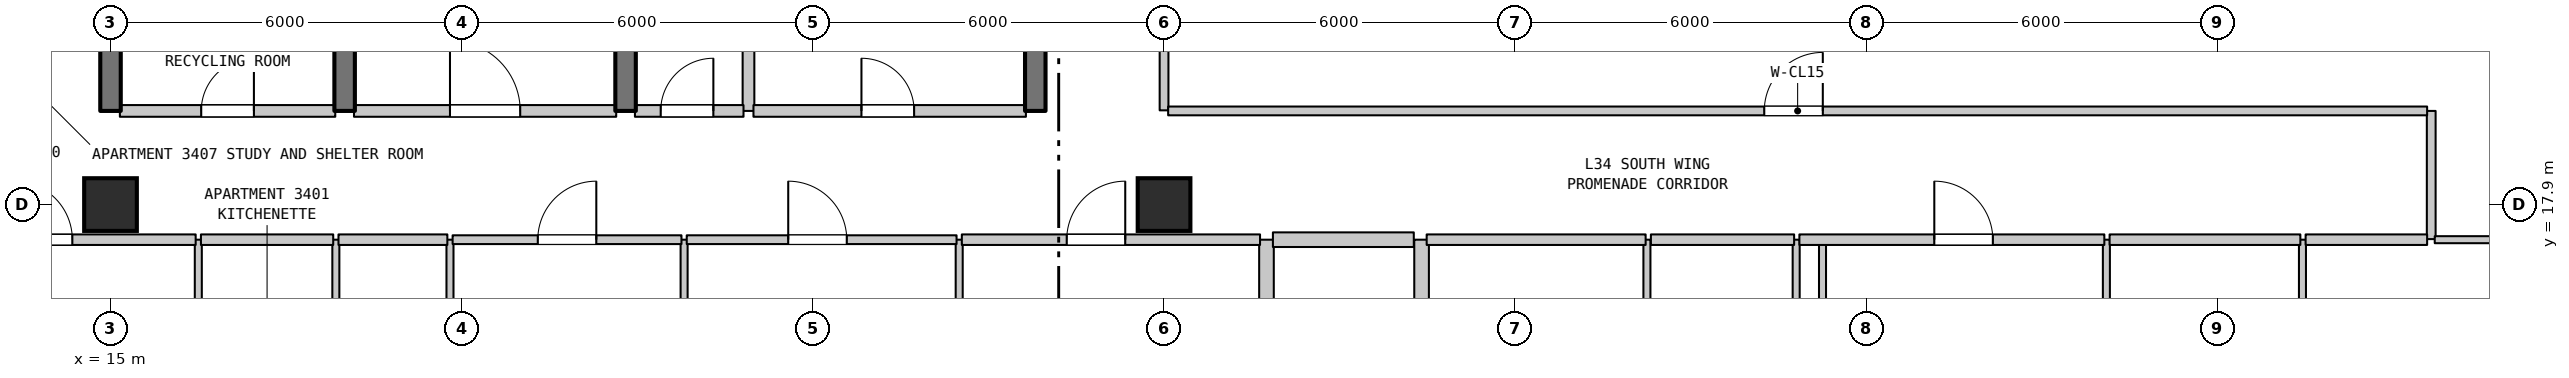
"""IFC4 building model, lengths in metres.
Left out: names, types, materials, properties, quantities, classifications, styles, units other than length and angle.
Written with IfcOpenShell. Run it as: python <this file> out.ifc"""

import sys

from ifc_helpers import new_model, si_unit, direction, frame, frame_2d, origin, origin_2d, place, context, subcontext, project, spatial, rectangle, extrude, element, fill, save


model = new_model("IFC4")
c1 = context("Model", 3, precision=1e-05, world=origin(), true_north=direction((0.0, 1.0)))
c2 = subcontext(c1, "Body", "Model", "MODEL_VIEW")
j1 = project(units=[si_unit("LENGTHUNIT", "METRE"), si_unit("PLANEANGLEUNIT", "RADIAN")], contexts=[c1])
p1 = place(None, origin())
s1 = spatial("IfcSite", under=j1, at=p1, CompositionType="ELEMENT")
p2 = place(p1, origin())
s2 = spatial("IfcBuilding", under=s1, at=p2, CompositionType="ELEMENT")
p3 = place(p2, frame((0.0, 0.0, 140.9)))
s3 = spatial("IfcBuildingStorey", under=s2, at=p3, CompositionType="ELEMENT", Elevation=140.9)
for number, where, z_axis, x_axis in (
    (1, (15.0, 17.9, 0.0), (0.0, 0.0, 1.0), (1.0, 0.0, 0.0)),
    (2, (33.0, 17.9, 0.0), (0.0, 0.0, 1.0), (1.0, 0.0, 0.0)),
):
    element("IfcColumn", number, at=place(p3, frame(where, z_axis=z_axis, x_axis=x_axis)), inside=s3, PredefinedType="COLUMN", context=c2, shape_type="SweptSolid", body=[
        extrude(rectangle(XDim=0.9, YDim=0.9, at=origin_2d()), origin(), (0.0, 0.0, 1.0), 3.7),
    ])
p4 = place(p3, frame((15.0, 19.5, 0.0), z_axis=(0.0, 0.0, 1.0), x_axis=(0.0, 1.0, 0.0)))
e3 = element("IfcWall", 3, at=p4, inside=s3, PredefinedType="SHEAR", context=c2, shape_type="SweptSolid", body=[
    extrude(rectangle(XDim=3.2, YDim=0.35, at=frame_2d((1.6, 0.0))), origin(), (0.0, 0.0, 1.0), 3.385),
])
p5 = place(p3, frame((16.5, 14.1, 0.0), z_axis=(0.0, 0.0, 1.0), x_axis=(0.0, 1.0, 0.0)))
e4 = element("IfcWall", 4, at=p5, inside=s3, PredefinedType="PARTITIONING", context=c2, shape_type="SweptSolid", body=[
    extrude(rectangle(XDim=3.2, YDim=0.12, at=frame_2d((1.6, 0.0))), origin(), (0.0, 0.0, 1.0), 3.385),
])
p6 = place(p5, frame((1.15, 0.0, 0.0)))
e5 = element("IfcOpeningElement", 5, at=p6, cuts=e4, PredefinedType="OPENING", context=c2, shape_type="SweptSolid", body=[
    extrude(rectangle(XDim=0.9, YDim=2.15, at=frame_2d((0.45, 1.075))), frame((0.0, 0.07, 0.0), z_axis=(0.0, -1.0, 0.0), x_axis=(1.0, 0.0, 0.0)), (0.0, 0.0, 1.0), 0.14),
])
p7 = place(p3, frame((18.85, 14.1, 0.0), z_axis=(0.0, 0.0, 1.0), x_axis=(0.0, 1.0, 0.0)))
e6 = element("IfcWall", 6, at=p7, inside=s3, PredefinedType="PARTITIONING", context=c2, shape_type="SweptSolid", body=[
    extrude(rectangle(XDim=3.2, YDim=0.12, at=frame_2d((1.6, 0.0))), origin(), (0.0, 0.0, 1.0), 3.385),
])
p8 = place(p3, frame((19.0, 19.5, 0.0), z_axis=(0.0, 0.0, 1.0), x_axis=(0.0, 1.0, 0.0)))
e7 = element("IfcWall", 7, at=p8, inside=s3, PredefinedType="SHEAR", context=c2, shape_type="SweptSolid", body=[
    extrude(rectangle(XDim=3.2, YDim=0.35, at=frame_2d((1.6, 0.0))), origin(), (0.0, 0.0, 1.0), 3.385),
])
p9 = place(p3, frame((20.8, 6.888, 0.0), z_axis=(0.0, 0.0, 1.0), x_axis=(0.0, 1.0, 0.0)))
e8 = element("IfcWall", 8, at=p9, inside=s3, PredefinedType="PARTITIONING", context=c2, shape_type="SweptSolid", body=[
    extrude(rectangle(XDim=10.412, YDim=0.12, at=frame_2d((5.206, 0.0))), origin(), (0.0, 0.0, 1.0), 3.385),
])
p10 = place(p3, frame((23.8, 19.5, 0.0), z_axis=(0.0, 0.0, 1.0), x_axis=(0.0, 1.0, 0.0)))
e9 = element("IfcWall", 9, at=p10, inside=s3, PredefinedType="SHEAR", context=c2, shape_type="SweptSolid", body=[
    extrude(rectangle(XDim=3.2, YDim=0.35, at=frame_2d((1.6, 0.0))), origin(), (0.0, 0.0, 1.0), 3.385),
])
p11 = place(p3, frame((24.8, 0.71, 0.0), z_axis=(0.0, 0.0, 1.0), x_axis=(0.0, 1.0, 0.0)))
e10 = element("IfcWall", 10, at=p11, inside=s3, PredefinedType="PARTITIONING", context=c2, shape_type="SweptSolid", body=[
    extrude(rectangle(XDim=16.59, YDim=0.12, at=frame_2d((8.295, 0.0))), origin(), (0.0, 0.0, 1.0), 3.385),
])
p12 = place(p3, frame((25.9, 19.5, 0.0), z_axis=(0.0, 0.0, 1.0), x_axis=(0.0, 1.0, 0.0)))
e11 = element("IfcWall", 11, at=p12, inside=s3, PredefinedType="STANDARD", context=c2, shape_type="SweptSolid", body=[
    extrude(rectangle(XDim=3.2, YDim=0.2, at=frame_2d((1.6, 0.0))), origin(), (0.0, 0.0, 1.0), 3.385),
])
p13 = place(p3, frame((29.5, 14.85, 0.0), z_axis=(0.0, 0.0, 1.0), x_axis=(0.0, 1.0, 0.0)))
e12 = element("IfcWall", 12, at=p13, inside=s3, PredefinedType="PARTITIONING", context=c2, shape_type="SweptSolid", body=[
    extrude(rectangle(XDim=2.45, YDim=0.12, at=frame_2d((1.225, 0.0))), origin(), (0.0, 0.0, 1.0), 3.385),
])
p14 = place(p3, frame((30.8, 19.5, 0.0), z_axis=(0.0, 0.0, 1.0), x_axis=(0.0, 1.0, 0.0)))
e13 = element("IfcWall", 13, at=p14, inside=s3, PredefinedType="SHEAR", context=c2, shape_type="SweptSolid", body=[
    extrude(rectangle(XDim=3.2, YDim=0.35, at=frame_2d((1.6, 0.0))), origin(), (0.0, 0.0, 1.0), 3.385),
])
p15 = place(p3, frame((33.0, 19.51, 0.0), z_axis=(0.0, 0.0, 1.0), x_axis=(0.0, 1.0, 0.0)))
e14 = element("IfcWall", 14, at=p15, inside=s3, PredefinedType="STANDARD", context=c2, shape_type="SweptSolid", body=[
    extrude(rectangle(XDim=3.66, YDim=0.15, at=frame_2d((1.83, 0.0))), origin(), (0.0, 0.0, 1.0), 2.935),
])
p16 = place(p15, frame((1.258, 0.0, 0.0)))
e15 = element("IfcOpeningElement", 15, at=p16, cuts=e14, PredefinedType="OPENING", context=c2, shape_type="SweptSolid", body=[
    extrude(rectangle(XDim=1.0, YDim=2.15, at=frame_2d((0.5, 1.075))), frame((0.0, 0.085, 0.0), z_axis=(0.0, -1.0, 0.0), x_axis=(1.0, 0.0, 0.0)), (0.0, 0.0, 1.0), 0.17),
])
for number, where, z_axis, x_axis in (
    (16, (34.75, 11.15, 0.0), (0.0, 0.0, 1.0), (0.0, 1.0, 0.0)),
    (17, (37.4, 11.15, 0.0), (0.0, 0.0, 1.0), (0.0, 1.0, 0.0)),
):
    element("IfcWall", number, at=place(p3, frame(where, z_axis=z_axis, x_axis=x_axis)), inside=s3, PredefinedType="STANDARD", context=c2, shape_type="SweptSolid", body=[
        extrude(rectangle(XDim=6.15, YDim=0.25, at=frame_2d((3.075, 0.0))), origin(), (0.0, 0.0, 1.0), 3.385),
    ])
for number, where, z_axis, x_axis in (
    (18, (41.25, 11.15, 0.0), (0.0, 0.0, 1.0), (0.0, 1.0, 0.0)),
    (19, (43.8, 11.15, 0.0), (0.0, 0.0, 1.0), (0.0, 1.0, 0.0)),
):
    element("IfcWall", number, at=place(p3, frame(where, z_axis=z_axis, x_axis=x_axis)), inside=s3, PredefinedType="PARTITIONING", context=c2, shape_type="SweptSolid", body=[
        extrude(rectangle(XDim=6.15, YDim=0.12, at=frame_2d((3.075, 0.0))), origin(), (0.0, 0.0, 1.0), 3.385),
    ])
p17 = place(p3, frame((44.25, 14.85, 0.0), z_axis=(0.0, 0.0, 1.0), x_axis=(0.0, 1.0, 0.0)))
e20 = element("IfcWall", 20, at=p17, inside=s3, PredefinedType="PARTITIONING", context=c2, shape_type="SweptSolid", body=[
    extrude(rectangle(XDim=2.45, YDim=0.12, at=frame_2d((1.225, 0.0))), origin(), (0.0, 0.0, 1.0), 3.385),
])
for number, where, z_axis, x_axis in (
    (21, (49.1, 11.15, 0.0), (0.0, 0.0, 1.0), (0.0, 1.0, 0.0)),
    (22, (52.45, 11.15, 0.0), (0.0, 0.0, 1.0), (0.0, 1.0, 0.0)),
):
    element("IfcWall", number, at=place(p3, frame(where, z_axis=z_axis, x_axis=x_axis)), inside=s3, PredefinedType="PARTITIONING", context=c2, shape_type="SweptSolid", body=[
        extrude(rectangle(XDim=6.15, YDim=0.12, at=frame_2d((3.075, 0.0))), origin(), (0.0, 0.0, 1.0), 3.385),
    ])
p18 = place(p3, frame((54.65, 17.31, 0.0), z_axis=(0.0, 0.0, 1.0), x_axis=(0.0, 1.0, 0.0)))
e23 = element("IfcWall", 23, at=p18, inside=s3, PredefinedType="STANDARD", context=c2, shape_type="SweptSolid", body=[
    extrude(rectangle(XDim=2.19, YDim=0.15, at=frame_2d((1.095, 0.0))), origin(), (0.0, 0.0, 1.0), 3.385),
])
p19 = place(p3, frame((12.875, 17.3, 0.0), z_axis=(0.0, 0.0, 1.0), x_axis=(1.0, 0.0, 0.0)))
e24 = element("IfcWall", 24, at=p19, inside=s3, PredefinedType="STANDARD", context=c2, shape_type="SweptSolid", body=[
    extrude(rectangle(XDim=3.58, YDim=0.18, at=frame_2d((1.79, 0.0))), origin(), (0.0, 0.0, 1.0), 3.385),
])
p20 = place(p19, frame((0.473, 0.0, 0.0)))
e25 = element("IfcOpeningElement", 25, at=p20, cuts=e24, PredefinedType="OPENING", context=c2, shape_type="SweptSolid", body=[
    extrude(rectangle(XDim=1.0, YDim=2.15, at=frame_2d((0.5, 1.075))), frame((0.0, 0.1, 0.0), z_axis=(0.0, -1.0, 0.0), x_axis=(1.0, 0.0, 0.0)), (0.0, 0.0, 1.0), 0.2),
])
p21 = place(p3, frame((16.545, 17.3, 0.0), z_axis=(0.0, 0.0, 1.0), x_axis=(1.0, 0.0, 0.0)))
e26 = element("IfcWall", 26, at=p21, inside=s3, PredefinedType="STANDARD", context=c2, shape_type="SweptSolid", body=[
    extrude(rectangle(XDim=2.26, YDim=0.18, at=frame_2d((1.13, 0.0))), origin(), (0.0, 0.0, 1.0), 3.385),
])
p22 = place(p3, frame((18.895, 17.3, 0.0), z_axis=(0.0, 0.0, 1.0), x_axis=(1.0, 0.0, 0.0)))
e27 = element("IfcWall", 27, at=p22, inside=s3, PredefinedType="STANDARD", context=c2, shape_type="SweptSolid", body=[
    extrude(rectangle(XDim=1.86, YDim=0.18, at=frame_2d((0.93, 0.0))), origin(), (0.0, 0.0, 1.0), 3.385),
])
p23 = place(p3, frame((20.845, 17.3, 0.0), z_axis=(0.0, 0.0, 1.0), x_axis=(1.0, 0.0, 0.0)))
e28 = element("IfcWall", 28, at=p23, inside=s3, PredefinedType="STANDARD", context=c2, shape_type="SweptSolid", body=[
    extrude(rectangle(XDim=3.91, YDim=0.15, at=frame_2d((1.955, 0.0))), origin(), (0.0, 0.0, 1.0), 3.385),
])
p24 = place(p23, frame((1.455, 0.0, 0.0)))
e29 = element("IfcOpeningElement", 29, at=p24, cuts=e28, PredefinedType="OPENING", context=c2, shape_type="SweptSolid", body=[
    extrude(rectangle(XDim=1.0, YDim=2.15, at=frame_2d((0.5, 1.075))), frame((0.0, 0.085, 0.0), z_axis=(0.0, -1.0, 0.0), x_axis=(1.0, 0.0, 0.0)), (0.0, 0.0, 1.0), 0.17),
])
p25 = place(p3, frame((24.845, 17.3, 0.0), z_axis=(0.0, 0.0, 1.0), x_axis=(1.0, 0.0, 0.0)))
e30 = element("IfcWall", 30, at=p25, inside=s3, PredefinedType="STANDARD", context=c2, shape_type="SweptSolid", body=[
    extrude(rectangle(XDim=4.61, YDim=0.15, at=frame_2d((2.305, 0.0))), origin(), (0.0, 0.0, 1.0), 3.385),
])
p26 = place(p25, frame((1.734, 0.0, 0.0)))
e31 = element("IfcOpeningElement", 31, at=p26, cuts=e30, PredefinedType="OPENING", context=c2, shape_type="SweptSolid", body=[
    extrude(rectangle(XDim=1.0, YDim=2.15, at=frame_2d((0.5, 1.075))), frame((0.0, 0.085, 0.0), z_axis=(0.0, -1.0, 0.0), x_axis=(1.0, 0.0, 0.0)), (0.0, 0.0, 1.0), 0.17),
])
p27 = place(p3, frame((29.545, 17.3, 0.0), z_axis=(0.0, 0.0, 1.0), x_axis=(1.0, 0.0, 0.0)))
e32 = element("IfcWall", 32, at=p27, inside=s3, PredefinedType="STANDARD", context=c2, shape_type="SweptSolid", body=[
    extrude(rectangle(XDim=5.095, YDim=0.18, at=frame_2d((2.547, 0.0))), origin(), (0.0, 0.0, 1.0), 3.385),
])
p28 = place(p27, frame((1.792, 0.0, 0.0)))
e33 = element("IfcOpeningElement", 33, at=p28, cuts=e32, PredefinedType="OPENING", context=c2, shape_type="SweptSolid", body=[
    extrude(rectangle(XDim=1.0, YDim=2.15, at=frame_2d((0.5, 1.075))), frame((0.0, 0.1, 0.0), z_axis=(0.0, -1.0, 0.0), x_axis=(1.0, 0.0, 0.0)), (0.0, 0.0, 1.0), 0.2),
])
p29 = place(p3, frame((34.86, 17.3, 0.0), z_axis=(0.0, 0.0, 1.0), x_axis=(1.0, 0.0, 0.0)))
e34 = element("IfcWall", 34, at=p29, inside=s3, PredefinedType="STANDARD", context=c2, shape_type="SweptSolid", body=[
    extrude(rectangle(XDim=2.407, YDim=0.25, at=frame_2d((1.204, 0.0))), origin(), (0.0, 0.0, 1.0), 3.385),
])
p30 = place(p3, frame((37.487, 17.3, 0.0), z_axis=(0.0, 0.0, 1.0), x_axis=(1.0, 0.0, 0.0)))
e35 = element("IfcWall", 35, at=p30, inside=s3, PredefinedType="STANDARD", context=c2, shape_type="SweptSolid", body=[
    extrude(rectangle(XDim=3.741, YDim=0.18, at=frame_2d((1.871, 0.0))), origin(), (0.0, 0.0, 1.0), 3.385),
])
p31 = place(p3, frame((41.318, 17.3, 0.0), z_axis=(0.0, 0.0, 1.0), x_axis=(1.0, 0.0, 0.0)))
e36 = element("IfcWall", 36, at=p31, inside=s3, PredefinedType="STANDARD", context=c2, shape_type="SweptSolid", body=[
    extrude(rectangle(XDim=2.447, YDim=0.18, at=frame_2d((1.223, 0.0))), origin(), (0.0, 0.0, 1.0), 3.385),
])
p32 = place(p3, frame((43.855, 17.3, 0.0), z_axis=(0.0, 0.0, 1.0), x_axis=(1.0, 0.0, 0.0)))
e37 = element("IfcWall", 37, at=p32, inside=s3, PredefinedType="STANDARD", context=c2, shape_type="SweptSolid", body=[
    extrude(rectangle(XDim=5.21, YDim=0.18, at=frame_2d((2.605, 0.0))), origin(), (0.0, 0.0, 1.0), 3.385),
])
p33 = place(p32, frame((2.305, 0.0, 0.0)))
e38 = element("IfcOpeningElement", 38, at=p33, cuts=e37, PredefinedType="OPENING", context=c2, shape_type="SweptSolid", body=[
    extrude(rectangle(XDim=1.0, YDim=2.15, at=frame_2d((0.5, 1.075))), frame((0.0, 0.1, 0.0), z_axis=(0.0, -1.0, 0.0), x_axis=(1.0, 0.0, 0.0)), (0.0, 0.0, 1.0), 0.2),
])
p34 = place(p3, frame((49.155, 17.3, 0.0), z_axis=(0.0, 0.0, 1.0), x_axis=(1.0, 0.0, 0.0)))
e39 = element("IfcWall", 39, at=p34, inside=s3, PredefinedType="STANDARD", context=c2, shape_type="SweptSolid", body=[
    extrude(rectangle(XDim=3.259, YDim=0.18, at=frame_2d((1.629, 0.0))), origin(), (0.0, 0.0, 1.0), 3.385),
])
p35 = place(p3, frame((52.504, 17.3, 0.0), z_axis=(0.0, 0.0, 1.0), x_axis=(1.0, 0.0, 0.0)))
e40 = element("IfcWall", 40, at=p35, inside=s3, PredefinedType="STANDARD", context=c2, shape_type="SweptSolid", body=[
    extrude(rectangle(XDim=2.076, YDim=0.18, at=frame_2d((1.038, 0.0))), origin(), (0.0, 0.0, 1.0), 3.385),
])
p36 = place(p3, frame((54.71, 17.3, 0.0), z_axis=(0.0, 0.0, 1.0), x_axis=(1.0, 0.0, 0.0)))
e41 = element("IfcWall", 41, at=p36, inside=s3, PredefinedType="PARTITIONING", context=c2, shape_type="SweptSolid", body=[
    extrude(rectangle(XDim=1.635, YDim=0.12, at=frame_2d((0.817, 0.0))), origin(), (0.0, 0.0, 1.0), 3.385),
])
p37 = place(p3, frame((15.16, 19.5, 0.0), z_axis=(0.0, 0.0, 1.0), x_axis=(1.0, 0.0, 0.0)))
e42 = element("IfcWall", 42, at=p37, inside=s3, PredefinedType="STANDARD", context=c2, shape_type="SweptSolid", body=[
    extrude(rectangle(XDim=3.68, YDim=0.2, at=frame_2d((1.84, 0.0))), origin(), (0.0, 0.0, 1.0), 3.385),
])
p38 = place(p37, frame((1.39, 0.0, 0.0)))
e43 = element("IfcOpeningElement", 43, at=p38, cuts=e42, PredefinedType="OPENING", context=c2, shape_type="SweptSolid", body=[
    extrude(rectangle(XDim=0.9, YDim=2.15, at=frame_2d((0.45, 1.075))), frame((0.0, 0.11, 0.0), z_axis=(0.0, -1.0, 0.0), x_axis=(1.0, 0.0, 0.0)), (0.0, 0.0, 1.0), 0.22),
])
p39 = place(p3, frame((19.16, 19.5, 0.0), z_axis=(0.0, 0.0, 1.0), x_axis=(1.0, 0.0, 0.0)))
e44 = element("IfcWall", 44, at=p39, inside=s3, PredefinedType="STANDARD", context=c2, shape_type="SweptSolid", body=[
    extrude(rectangle(XDim=4.48, YDim=0.2, at=frame_2d((2.24, 0.0))), origin(), (0.0, 0.0, 1.0), 3.385),
])
p40 = place(p39, frame((1.64, 0.0, 0.0)))
e45 = element("IfcOpeningElement", 45, at=p40, cuts=e44, PredefinedType="OPENING", context=c2, shape_type="SweptSolid", body=[
    extrude(rectangle(XDim=1.2, YDim=2.2, at=frame_2d((0.6, 1.1))), frame((0.0, 0.11, 0.0), z_axis=(0.0, -1.0, 0.0), x_axis=(1.0, 0.0, 0.0)), (0.0, 0.0, 1.0), 0.22),
])
p41 = place(p3, frame((23.96, 19.5, 0.0), z_axis=(0.0, 0.0, 1.0), x_axis=(1.0, 0.0, 0.0)))
e46 = element("IfcWall", 46, at=p41, inside=s3, PredefinedType="STANDARD", context=c2, shape_type="SweptSolid", body=[
    extrude(rectangle(XDim=1.855, YDim=0.2, at=frame_2d((0.927, 0.0))), origin(), (0.0, 0.0, 1.0), 3.385),
])
p42 = place(p41, frame((0.44, 0.0, 0.0)))
e47 = element("IfcOpeningElement", 47, at=p42, cuts=e46, PredefinedType="OPENING", context=c2, shape_type="SweptSolid", body=[
    extrude(rectangle(XDim=0.9, YDim=2.15, at=frame_2d((0.45, 1.075))), frame((0.0, 0.11, 0.0), z_axis=(0.0, -1.0, 0.0), x_axis=(1.0, 0.0, 0.0)), (0.0, 0.0, 1.0), 0.22),
])
p43 = place(p3, frame((25.985, 19.5, 0.0), z_axis=(0.0, 0.0, 1.0), x_axis=(1.0, 0.0, 0.0)))
e48 = element("IfcWall", 48, at=p43, inside=s3, PredefinedType="STANDARD", context=c2, shape_type="SweptSolid", body=[
    extrude(rectangle(XDim=4.655, YDim=0.2, at=frame_2d((2.327, 0.0))), origin(), (0.0, 0.0, 1.0), 3.385),
])
p44 = place(p43, frame((1.845, 0.0, 0.0)))
e49 = element("IfcOpeningElement", 49, at=p44, cuts=e48, PredefinedType="OPENING", context=c2, shape_type="SweptSolid", body=[
    extrude(rectangle(XDim=0.9, YDim=2.15, at=frame_2d((0.45, 1.075))), frame((0.0, 0.11, 0.0), z_axis=(0.0, -1.0, 0.0), x_axis=(1.0, 0.0, 0.0)), (0.0, 0.0, 1.0), 0.22),
])
p45 = place(p3, frame((33.07, 19.5, 0.0), z_axis=(0.0, 0.0, 1.0), x_axis=(1.0, 0.0, 0.0)))
e50 = element("IfcWall", 50, at=p45, inside=s3, PredefinedType="STANDARD", context=c2, shape_type="SweptSolid", body=[
    extrude(rectangle(XDim=21.51, YDim=0.15, at=frame_2d((10.755, 0.0))), origin(), (0.0, 0.0, 1.0), 3.385),
])
p46 = place(p45, frame((10.185, 0.0, 0.0)))
e51 = element("IfcOpeningElement", 51, at=p46, cuts=e50, PredefinedType="OPENING", context=c2, shape_type="SweptSolid", body=[
    extrude(rectangle(XDim=1.0, YDim=2.15, at=frame_2d((0.5, 1.075))), frame((0.0, 0.085, 0.0), z_axis=(0.0, -1.0, 0.0), x_axis=(1.0, 0.0, 0.0)), (0.0, 0.0, 1.0), 0.17),
])
p47 = place(p20, origin())
e52 = element("IfcDoor", 52, at=p47, inside=s3, OperationType="SINGLE_SWING_LEFT", PredefinedType="DOOR", context=c2, shape_type="SweptSolid", body=[
    extrude(rectangle(XDim=1.0, YDim=2.15, at=frame_2d((0.5, 1.075))), frame((0.0, 0.025, 0.0), z_axis=(0.0, -1.0, 0.0), x_axis=(1.0, 0.0, 0.0)), (0.0, 0.0, 1.0), 0.05),
])
fill(e25, e52)
p48 = place(p24, origin())
e53 = element("IfcDoor", 53, at=p48, inside=s3, OperationType="SINGLE_SWING_RIGHT", PredefinedType="DOOR", context=c2, shape_type="SweptSolid", body=[
    extrude(rectangle(XDim=1.0, YDim=2.15, at=frame_2d((0.5, 1.075))), frame((0.0, 0.025, 0.0), z_axis=(0.0, -1.0, 0.0), x_axis=(1.0, 0.0, 0.0)), (0.0, 0.0, 1.0), 0.05),
])
fill(e29, e53)
p49 = place(p26, origin())
e54 = element("IfcDoor", 54, at=p49, inside=s3, OperationType="SINGLE_SWING_LEFT", PredefinedType="DOOR", context=c2, shape_type="SweptSolid", body=[
    extrude(rectangle(XDim=1.0, YDim=2.15, at=frame_2d((0.5, 1.075))), frame((0.0, 0.025, 0.0), z_axis=(0.0, -1.0, 0.0), x_axis=(1.0, 0.0, 0.0)), (0.0, 0.0, 1.0), 0.05),
])
fill(e31, e54)
p50 = place(p28, origin())
e55 = element("IfcDoor", 55, at=p50, inside=s3, OperationType="SINGLE_SWING_RIGHT", PredefinedType="DOOR", context=c2, shape_type="SweptSolid", body=[
    extrude(rectangle(XDim=1.0, YDim=2.15, at=frame_2d((0.5, 1.075))), frame((0.0, 0.025, 0.0), z_axis=(0.0, -1.0, 0.0), x_axis=(1.0, 0.0, 0.0)), (0.0, 0.0, 1.0), 0.05),
])
fill(e33, e55)
p51 = place(p33, origin())
e56 = element("IfcDoor", 56, at=p51, inside=s3, OperationType="SINGLE_SWING_LEFT", PredefinedType="DOOR", context=c2, shape_type="SweptSolid", body=[
    extrude(rectangle(XDim=1.0, YDim=2.15, at=frame_2d((0.5, 1.075))), frame((0.0, 0.025, 0.0), z_axis=(0.0, -1.0, 0.0), x_axis=(1.0, 0.0, 0.0)), (0.0, 0.0, 1.0), 0.05),
])
fill(e38, e56)
p52 = place(p38, origin())
e57 = element("IfcDoor", 57, at=p52, inside=s3, OperationType="SINGLE_SWING_RIGHT", PredefinedType="DOOR", context=c2, shape_type="SweptSolid", body=[
    extrude(rectangle(XDim=0.9, YDim=2.15, at=frame_2d((0.45, 1.075))), frame((0.0, 0.025, 0.0), z_axis=(0.0, -1.0, 0.0), x_axis=(1.0, 0.0, 0.0)), (0.0, 0.0, 1.0), 0.05),
])
fill(e43, e57)
p53 = place(p40, origin())
e58 = element("IfcDoor", 58, at=p53, inside=s3, OperationType="SINGLE_SWING_LEFT", PredefinedType="DOOR", context=c2, shape_type="SweptSolid", body=[
    extrude(rectangle(XDim=1.2, YDim=2.2, at=frame_2d((0.6, 1.1))), frame((0.0, 0.025, 0.0), z_axis=(0.0, -1.0, 0.0), x_axis=(1.0, 0.0, 0.0)), (0.0, 0.0, 1.0), 0.05),
])
fill(e45, e58)
p54 = place(p42, origin())
e59 = element("IfcDoor", 59, at=p54, inside=s3, OperationType="SINGLE_SWING_RIGHT", PredefinedType="DOOR", context=c2, shape_type="SweptSolid", body=[
    extrude(rectangle(XDim=0.9, YDim=2.15, at=frame_2d((0.45, 1.075))), frame((0.0, 0.025, 0.0), z_axis=(0.0, -1.0, 0.0), x_axis=(1.0, 0.0, 0.0)), (0.0, 0.0, 1.0), 0.05),
])
fill(e47, e59)
p55 = place(p44, origin())
e60 = element("IfcDoor", 60, at=p55, inside=s3, OperationType="SINGLE_SWING_LEFT", PredefinedType="DOOR", context=c2, shape_type="SweptSolid", body=[
    extrude(rectangle(XDim=0.9, YDim=2.15, at=frame_2d((0.45, 1.075))), frame((0.0, 0.025, 0.0), z_axis=(0.0, -1.0, 0.0), x_axis=(1.0, 0.0, 0.0)), (0.0, 0.0, 1.0), 0.05),
])
fill(e49, e60)
p56 = place(p46, origin())
e61 = element("IfcDoor", 61, at=p56, inside=s3, OperationType="SINGLE_SWING_RIGHT", PredefinedType="DOOR", context=c2, shape_type="SweptSolid", body=[
    extrude(rectangle(XDim=1.0, YDim=2.15, at=frame_2d((0.5, 1.075))), frame((0.0, 0.025, 0.0), z_axis=(0.0, -1.0, 0.0), x_axis=(1.0, 0.0, 0.0)), (0.0, 0.0, 1.0), 0.05),
])
fill(e51, e61)
save(model, sys.argv[1])
